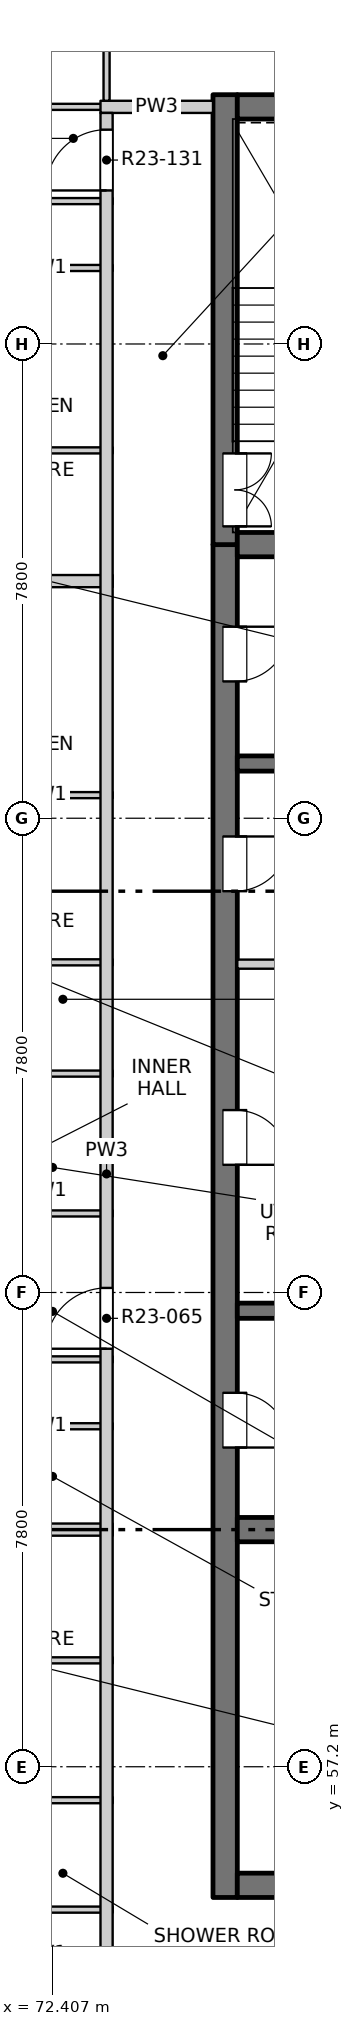
"""IFC4 building model, lengths in metres.
Left out: names, types, materials, properties, quantities, classifications, styles, units other than length and angle.
Written with IfcOpenShell. Run it as: python <this file> out.ifc"""

import sys

from ifc_helpers import new_model, si_unit, direction, frame, frame_2d, origin, place, context, subcontext, project, spatial, rectangle, extrude, element, fill, save


model = new_model("IFC4")
c1 = context("Model", 3, precision=1e-05, world=origin(), true_north=direction((0.0, 1.0)))
c2 = subcontext(c1, "Body", "Model", "MODEL_VIEW")
j1 = project(units=[si_unit("LENGTHUNIT", "METRE"), si_unit("PLANEANGLEUNIT", "RADIAN")], contexts=[c1])
p1 = place(None, origin())
s1 = spatial("IfcSite", under=j1, at=p1, CompositionType="ELEMENT")
p2 = place(p1, origin())
s2 = spatial("IfcBuilding", under=s1, at=p2, CompositionType="ELEMENT")
p3 = place(p2, frame((0.0, 0.0, 238.1)))
s3 = spatial("IfcBuildingStorey", under=s2, at=p3, CompositionType="ELEMENT", Elevation=238.1)
p4 = place(p3, frame((75.25, 55.05, -0.25), z_axis=(0.0, 0.0, 1.0), x_axis=(0.0, 1.0, 0.0)))
e1 = element("IfcWall", 1, at=p4, inside=s3, PredefinedType="SOLIDWALL", context=c2, shape_type="SweptSolid", body=[
    extrude(rectangle(XDim=22.25, YDim=0.4, at=frame_2d((11.125, 0.0))), origin(), (0.0, 0.0, 1.0), 3.35),
])
p5 = place(p4, frame((7.4, 0.0, 0.25)))
e2 = element("IfcOpeningElement", 2, at=p5, cuts=e1, PredefinedType="OPENING", context=c2, shape_type="SweptSolid", body=[
    extrude(rectangle(XDim=0.9, YDim=2.1, at=frame_2d((0.45, 1.05))), frame((0.0, 0.21, 0.0), z_axis=(0.0, -1.0, 0.0), x_axis=(1.0, 0.0, 0.0)), (0.0, 0.0, 1.0), 0.42),
])
p6 = place(p4, frame((12.05, 0.0, 0.25)))
e3 = element("IfcOpeningElement", 3, at=p6, cuts=e1, PredefinedType="OPENING", context=c2, shape_type="SweptSolid", body=[
    extrude(rectangle(XDim=0.9, YDim=2.1, at=frame_2d((0.45, 1.05))), frame((0.0, 0.21, 0.0), z_axis=(0.0, -1.0, 0.0), x_axis=(1.0, 0.0, 0.0)), (0.0, 0.0, 1.0), 0.42),
])
p7 = place(p4, frame((16.55, 0.0, 0.25)))
e4 = element("IfcOpeningElement", 4, at=p7, cuts=e1, PredefinedType="OPENING", context=c2, shape_type="SweptSolid", body=[
    extrude(rectangle(XDim=0.9, YDim=2.1, at=frame_2d((0.45, 1.05))), frame((0.0, 0.21, 0.0), z_axis=(0.0, -1.0, 0.0), x_axis=(1.0, 0.0, 0.0)), (0.0, 0.0, 1.0), 0.42),
])
p8 = place(p4, frame((20.0, 0.0, 0.25)))
e5 = element("IfcOpeningElement", 5, at=p8, cuts=e1, PredefinedType="OPENING", context=c2, shape_type="SweptSolid", body=[
    extrude(rectangle(XDim=0.9, YDim=2.1, at=frame_2d((0.45, 1.05))), frame((0.0, 0.21, 0.0), z_axis=(0.0, -1.0, 0.0), x_axis=(1.0, 0.0, 0.0)), (0.0, 0.0, 1.0), 0.42),
])
p9 = place(p3, frame((75.25, 77.3, -0.25), z_axis=(0.0, 0.0, 1.0), x_axis=(0.0, 1.0, 0.0)))
e6 = element("IfcWall", 6, at=p9, inside=s3, PredefinedType="SOLIDWALL", context=c2, shape_type="SweptSolid", body=[
    extrude(rectangle(XDim=7.4, YDim=0.4, at=frame_2d((3.7, 0.0))), origin(), (0.0, 0.0, 1.0), 3.35),
])
p10 = place(p9, frame((0.3, 0.0, 0.25)))
e7 = element("IfcOpeningElement", 7, at=p10, cuts=e6, PredefinedType="OPENING", context=c2, shape_type="SweptSolid", body=[
    extrude(rectangle(XDim=1.2, YDim=2.1, at=frame_2d((0.6, 1.05))), frame((0.0, 0.21, 0.0), z_axis=(0.0, -1.0, 0.0), x_axis=(1.0, 0.0, 0.0)), (0.0, 0.0, 1.0), 0.42),
])
p11 = place(p3, frame((75.45, 55.25, -0.25), z_axis=(0.0, 0.0, 1.0), x_axis=(1.0, 0.0, 0.0)))
e8 = element("IfcWall", 8, at=p11, inside=s3, PredefinedType="SOLIDWALL", context=c2, shape_type="SweptSolid", body=[
    extrude(rectangle(XDim=19.1, YDim=0.4, at=frame_2d((9.55, 0.0))), origin(), (0.0, 0.0, 1.0), 3.35),
])
p12 = place(p11, frame((8.8, 0.0, 0.25)))
e9 = element("IfcOpeningElement", 9, at=p12, cuts=e8, PredefinedType="OPENING", context=c2, shape_type="SweptSolid", body=[
    extrude(rectangle(XDim=1.5, YDim=2.1, at=frame_2d((0.75, 1.05))), frame((0.0, 0.21, 0.0), z_axis=(0.0, -1.0, 0.0), x_axis=(1.0, 0.0, 0.0)), (0.0, 0.0, 1.0), 0.42),
])
p13 = place(p3, frame((75.45, 84.5, -0.25), z_axis=(0.0, 0.0, 1.0), x_axis=(1.0, 0.0, 0.0)))
e10 = element("IfcWall", 10, at=p13, inside=s3, PredefinedType="SOLIDWALL", context=c2, shape_type="SweptSolid", body=[
    extrude(rectangle(XDim=19.1, YDim=0.4, at=frame_2d((9.55, 0.0))), origin(), (0.0, 0.0, 1.0), 3.35),
])
p14 = place(p3, frame((75.45, 61.1, -0.25), z_axis=(0.0, 0.0, 1.0), x_axis=(1.0, 0.0, 0.0)))
e11 = element("IfcWall", 11, at=p14, inside=s3, PredefinedType="SOLIDWALL", context=c2, shape_type="SweptSolid", body=[
    extrude(rectangle(XDim=3.875, YDim=0.4, at=frame_2d((1.938, 0.0))), origin(), (0.0, 0.0, 1.0), 3.35),
])
for number, where, z_axis, x_axis in (
    (12, (75.45, 64.7, -0.25), (0.0, 0.0, 1.0), (1.0, 0.0, 0.0)),
    (13, (75.45, 73.7, -0.25), (0.0, 0.0, 1.0), (1.0, 0.0, 0.0)),
):
    element("IfcWall", number, at=place(p3, frame(where, z_axis=z_axis, x_axis=x_axis)), inside=s3, PredefinedType="SOLIDWALL", context=c2, shape_type="SweptSolid", body=[
        extrude(rectangle(XDim=3.875, YDim=0.25, at=frame_2d((1.938, 0.0))), origin(), (0.0, 0.0, 1.0), 3.35),
    ])
p15 = place(p3, frame((75.45, 77.3, -0.25), z_axis=(0.0, 0.0, 1.0), x_axis=(1.0, 0.0, 0.0)))
e14 = element("IfcWall", 14, at=p15, inside=s3, PredefinedType="SOLIDWALL", context=c2, shape_type="SweptSolid", body=[
    extrude(rectangle(XDim=3.875, YDim=0.4, at=frame_2d((1.938, 0.0))), origin(), (0.0, 0.0, 1.0), 3.35),
])
for number, where, z_axis, x_axis in (
    (15, (71.18, 54.85, 0.0), (0.0, 0.0, 1.0), (1.0, 0.0, 0.0)),
    (16, (71.18, 56.65, 0.0), (0.0, 0.0, 1.0), (1.0, 0.0, 0.0)),
    (17, (71.18, 58.95, 0.0), (0.0, 0.0, 1.0), (1.0, 0.0, 0.0)),
):
    element("IfcWall", number, at=place(p3, frame(where, z_axis=z_axis, x_axis=x_axis)), inside=s3, PredefinedType="PARTITIONING", context=c2, shape_type="SweptSolid", body=[
        extrude(rectangle(XDim=2.22, YDim=0.1, at=frame_2d((1.11, 0.0))), origin(), (0.0, 0.0, 1.0), 3.1),
    ])
p16 = place(p3, frame((61.9, 61.1, 0.0), z_axis=(0.0, 0.0, 1.0), x_axis=(1.0, 0.0, 0.0)))
e18 = element("IfcWall", 18, at=p16, inside=s3, PredefinedType="PARTITIONING", context=c2, shape_type="SweptSolid", body=[
    extrude(rectangle(XDim=11.5, YDim=0.2, at=frame_2d((5.75, 0.0))), origin(), (0.0, 0.0, 1.0), 3.1),
])
for number, where, z_axis, x_axis in (
    (19, (71.18, 62.8, 0.0), (0.0, 0.0, 1.0), (1.0, 0.0, 0.0)),
    (20, (71.18, 63.9, 0.0), (0.0, 0.0, 1.0), (1.0, 0.0, 0.0)),
    (21, (71.18, 66.3, 0.0), (0.0, 0.0, 1.0), (1.0, 0.0, 0.0)),
    (22, (71.18, 68.6, 0.0), (0.0, 0.0, 1.0), (1.0, 0.0, 0.0)),
):
    element("IfcWall", number, at=place(p3, frame(where, z_axis=z_axis, x_axis=x_axis)), inside=s3, PredefinedType="PARTITIONING", context=c2, shape_type="SweptSolid", body=[
        extrude(rectangle(XDim=2.22, YDim=0.1, at=frame_2d((1.11, 0.0))), origin(), (0.0, 0.0, 1.0), 3.1),
    ])
p17 = place(p3, frame((75.45, 70.4, 0.0), z_axis=(0.0, 0.0, 1.0), x_axis=(1.0, 0.0, 0.0)))
e23 = element("IfcWall", 23, at=p17, inside=s3, PredefinedType="PARTITIONING", context=c2, shape_type="SweptSolid", body=[
    extrude(rectangle(XDim=3.875, YDim=0.15, at=frame_2d((1.938, 0.0))), origin(), (0.0, 0.0, 1.0), 3.1),
])
for number, where, z_axis, x_axis in (
    (24, (71.18, 70.43, 0.0), (0.0, 0.0, 1.0), (1.0, 0.0, 0.0)),
    (25, (71.18, 73.18, 0.0), (0.0, 0.0, 1.0), (1.0, 0.0, 0.0)),
):
    element("IfcWall", number, at=place(p3, frame(where, z_axis=z_axis, x_axis=x_axis)), inside=s3, PredefinedType="PARTITIONING", context=c2, shape_type="SweptSolid", body=[
        extrude(rectangle(XDim=2.22, YDim=0.1, at=frame_2d((1.11, 0.0))), origin(), (0.0, 0.0, 1.0), 3.1),
    ])
p18 = place(p3, frame((61.9, 76.7, 0.0), z_axis=(0.0, 0.0, 1.0), x_axis=(1.0, 0.0, 0.0)))
e26 = element("IfcWall", 26, at=p18, inside=s3, PredefinedType="PARTITIONING", context=c2, shape_type="SweptSolid", body=[
    extrude(rectangle(XDim=11.5, YDim=0.2, at=frame_2d((5.75, 0.0))), origin(), (0.0, 0.0, 1.0), 3.1),
])
for number, where, z_axis, x_axis in (
    (27, (71.18, 78.85, 0.0), (0.0, 0.0, 1.0), (1.0, 0.0, 0.0)),
    (28, (71.18, 81.85, 0.0), (0.0, 0.0, 1.0), (1.0, 0.0, 0.0)),
    (29, (71.18, 82.95, 0.0), (0.0, 0.0, 1.0), (1.0, 0.0, 0.0)),
):
    element("IfcWall", number, at=place(p3, frame(where, z_axis=z_axis, x_axis=x_axis)), inside=s3, PredefinedType="PARTITIONING", context=c2, shape_type="SweptSolid", body=[
        extrude(rectangle(XDim=2.22, YDim=0.1, at=frame_2d((1.11, 0.0))), origin(), (0.0, 0.0, 1.0), 3.1),
    ])
p19 = place(p3, frame((61.9, 84.5, 0.0), z_axis=(0.0, 0.0, 1.0), x_axis=(1.0, 0.0, 0.0)))
e30 = element("IfcWall", 30, at=p19, inside=s3, PredefinedType="PARTITIONING", context=c2, shape_type="SweptSolid", body=[
    extrude(rectangle(XDim=11.5, YDim=0.1, at=frame_2d((5.75, 0.0))), origin(), (0.0, 0.0, 1.0), 3.1),
])
p20 = place(p19, frame((7.965, 0.0, 0.0)))
e31 = element("IfcOpeningElement", 31, at=p20, cuts=e30, PredefinedType="OPENING", context=c2, shape_type="SweptSolid", body=[
    extrude(rectangle(XDim=0.9, YDim=2.1, at=frame_2d((0.45, 1.05))), frame((0.0, 0.06, 0.0), z_axis=(0.0, -1.0, 0.0), x_axis=(1.0, 0.0, 0.0)), (0.0, 0.0, 1.0), 0.12),
])
p21 = place(p3, frame((73.2, 84.5, 0.0), z_axis=(0.0, 0.0, 1.0), x_axis=(1.0, 0.0, 0.0)))
e32 = element("IfcWall", 32, at=p21, inside=s3, PredefinedType="PARTITIONING", context=c2, shape_type="SweptSolid", body=[
    extrude(rectangle(XDim=1.85, YDim=0.2, at=frame_2d((0.925, 0.0))), origin(), (0.0, 0.0, 1.0), 3.1),
])
p22 = place(p3, frame((73.3, 49.5, 0.0), z_axis=(0.0, 0.0, 1.0), x_axis=(0.0, 1.0, 0.0)))
e33 = element("IfcWall", 33, at=p22, inside=s3, PredefinedType="PARTITIONING", context=c2, shape_type="SweptSolid", body=[
    extrude(rectangle(XDim=34.9, YDim=0.2, at=frame_2d((17.45, 0.0))), origin(), (0.0, 0.0, 1.0), 3.1),
])
p23 = place(p22, frame((3.075, 0.0, 0.0)))
e34 = element("IfcOpeningElement", 34, at=p23, cuts=e33, PredefinedType="OPENING", context=c2, shape_type="SweptSolid", body=[
    extrude(rectangle(XDim=1.0, YDim=2.1, at=frame_2d((0.5, 1.05))), frame((0.0, 0.11, 0.0), z_axis=(0.0, -1.0, 0.0), x_axis=(1.0, 0.0, 0.0)), (0.0, 0.0, 1.0), 0.22),
])
p24 = place(p22, frame((14.575, 0.0, 0.0)))
e35 = element("IfcOpeningElement", 35, at=p24, cuts=e33, PredefinedType="OPENING", context=c2, shape_type="SweptSolid", body=[
    extrude(rectangle(XDim=1.0, YDim=2.1, at=frame_2d((0.5, 1.05))), frame((0.0, 0.11, 0.0), z_axis=(0.0, -1.0, 0.0), x_axis=(1.0, 0.0, 0.0)), (0.0, 0.0, 1.0), 0.22),
])
p25 = place(p22, frame((33.625, 0.0, 0.0)))
e36 = element("IfcOpeningElement", 36, at=p25, cuts=e33, PredefinedType="OPENING", context=c2, shape_type="SweptSolid", body=[
    extrude(rectangle(XDim=1.0, YDim=2.1, at=frame_2d((0.5, 1.05))), frame((0.0, 0.11, 0.0), z_axis=(0.0, -1.0, 0.0), x_axis=(1.0, 0.0, 0.0)), (0.0, 0.0, 1.0), 0.22),
])
p26 = place(p3, frame((73.3, 84.6, 0.0), z_axis=(0.0, 0.0, 1.0), x_axis=(0.0, 1.0, 0.0)))
e37 = element("IfcWall", 37, at=p26, inside=s3, PredefinedType="PARTITIONING", context=c2, shape_type="SweptSolid", body=[
    extrude(rectangle(XDim=3.5, YDim=0.1, at=frame_2d((1.75, 0.0))), origin(), (0.0, 0.0, 1.0), 3.1),
])
p27 = place(p26, frame((1.4, 0.0, 0.0)))
e38 = element("IfcOpeningElement", 38, at=p27, cuts=e37, PredefinedType="OPENING", context=c2, shape_type="SweptSolid", body=[
    extrude(rectangle(XDim=0.9, YDim=2.1, at=frame_2d((0.45, 1.05))), frame((0.0, 0.06, 0.0), z_axis=(0.0, -1.0, 0.0), x_axis=(1.0, 0.0, 0.0)), (0.0, 0.0, 1.0), 0.12),
])
p28 = place(p5, origin())
e39 = element("IfcDoor", 39, at=p28, inside=s3, OperationType="SINGLE_SWING_RIGHT", PredefinedType="DOOR", context=c2, shape_type="SweptSolid", body=[
    extrude(rectangle(XDim=0.9, YDim=2.1, at=frame_2d((0.45, 1.05))), frame((0.0, -0.135, 0.0), z_axis=(0.0, -1.0, 0.0), x_axis=(1.0, 0.0, 0.0)), (0.0, 0.0, 1.0), 0.05),
])
fill(e2, e39)
p29 = place(p24, origin())
e40 = element("IfcDoor", 40, at=p29, inside=s3, OperationType="SINGLE_SWING_RIGHT", PredefinedType="DOOR", context=c2, shape_type="SweptSolid", body=[
    extrude(rectangle(XDim=1.0, YDim=2.1, at=frame_2d((0.5, 1.05))), frame((0.0, 0.025, 0.0), z_axis=(0.0, -1.0, 0.0), x_axis=(1.0, 0.0, 0.0)), (0.0, 0.0, 1.0), 0.05),
])
fill(e35, e40)
p30 = place(p6, origin())
e41 = element("IfcDoor", 41, at=p30, inside=s3, OperationType="SINGLE_SWING_RIGHT", PredefinedType="DOOR", context=c2, shape_type="SweptSolid", body=[
    extrude(rectangle(XDim=0.9, YDim=2.1, at=frame_2d((0.45, 1.05))), frame((0.0, -0.135, 0.0), z_axis=(0.0, -1.0, 0.0), x_axis=(1.0, 0.0, 0.0)), (0.0, 0.0, 1.0), 0.05),
])
fill(e3, e41)
p31 = place(p7, origin())
e42 = element("IfcDoor", 42, at=p31, inside=s3, OperationType="SINGLE_SWING_LEFT", PredefinedType="DOOR", context=c2, shape_type="SweptSolid", body=[
    extrude(rectangle(XDim=0.9, YDim=2.1, at=frame_2d((0.45, 1.05))), frame((0.0, -0.135, 0.0), z_axis=(0.0, -1.0, 0.0), x_axis=(1.0, 0.0, 0.0)), (0.0, 0.0, 1.0), 0.05),
])
fill(e4, e42)
p32 = place(p8, origin())
e43 = element("IfcDoor", 43, at=p32, inside=s3, OperationType="SINGLE_SWING_LEFT", PredefinedType="DOOR", context=c2, shape_type="SweptSolid", body=[
    extrude(rectangle(XDim=0.9, YDim=2.1, at=frame_2d((0.45, 1.05))), frame((0.0, -0.135, 0.0), z_axis=(0.0, -1.0, 0.0), x_axis=(1.0, 0.0, 0.0)), (0.0, 0.0, 1.0), 0.05),
])
fill(e5, e43)
p33 = place(p10, origin())
e44 = element("IfcDoor", 44, at=p33, inside=s3, OperationType="DOUBLE_DOOR_SINGLE_SWING", PredefinedType="DOOR", context=c2, shape_type="SweptSolid", body=[
    extrude(rectangle(XDim=1.2, YDim=2.1, at=frame_2d((0.6, 1.05))), frame((0.0, -0.135, 0.0), z_axis=(0.0, -1.0, 0.0), x_axis=(1.0, 0.0, 0.0)), (0.0, 0.0, 1.0), 0.05),
])
fill(e7, e44)
p34 = place(p25, origin())
e45 = element("IfcDoor", 45, at=p34, inside=s3, OperationType="SINGLE_SWING_RIGHT", PredefinedType="DOOR", context=c2, shape_type="SweptSolid", body=[
    extrude(rectangle(XDim=1.0, YDim=2.1, at=frame_2d((0.5, 1.05))), frame((0.0, 0.025, 0.0), z_axis=(0.0, -1.0, 0.0), x_axis=(1.0, 0.0, 0.0)), (0.0, 0.0, 1.0), 0.05),
])
fill(e36, e45)
save(model, sys.argv[1])
